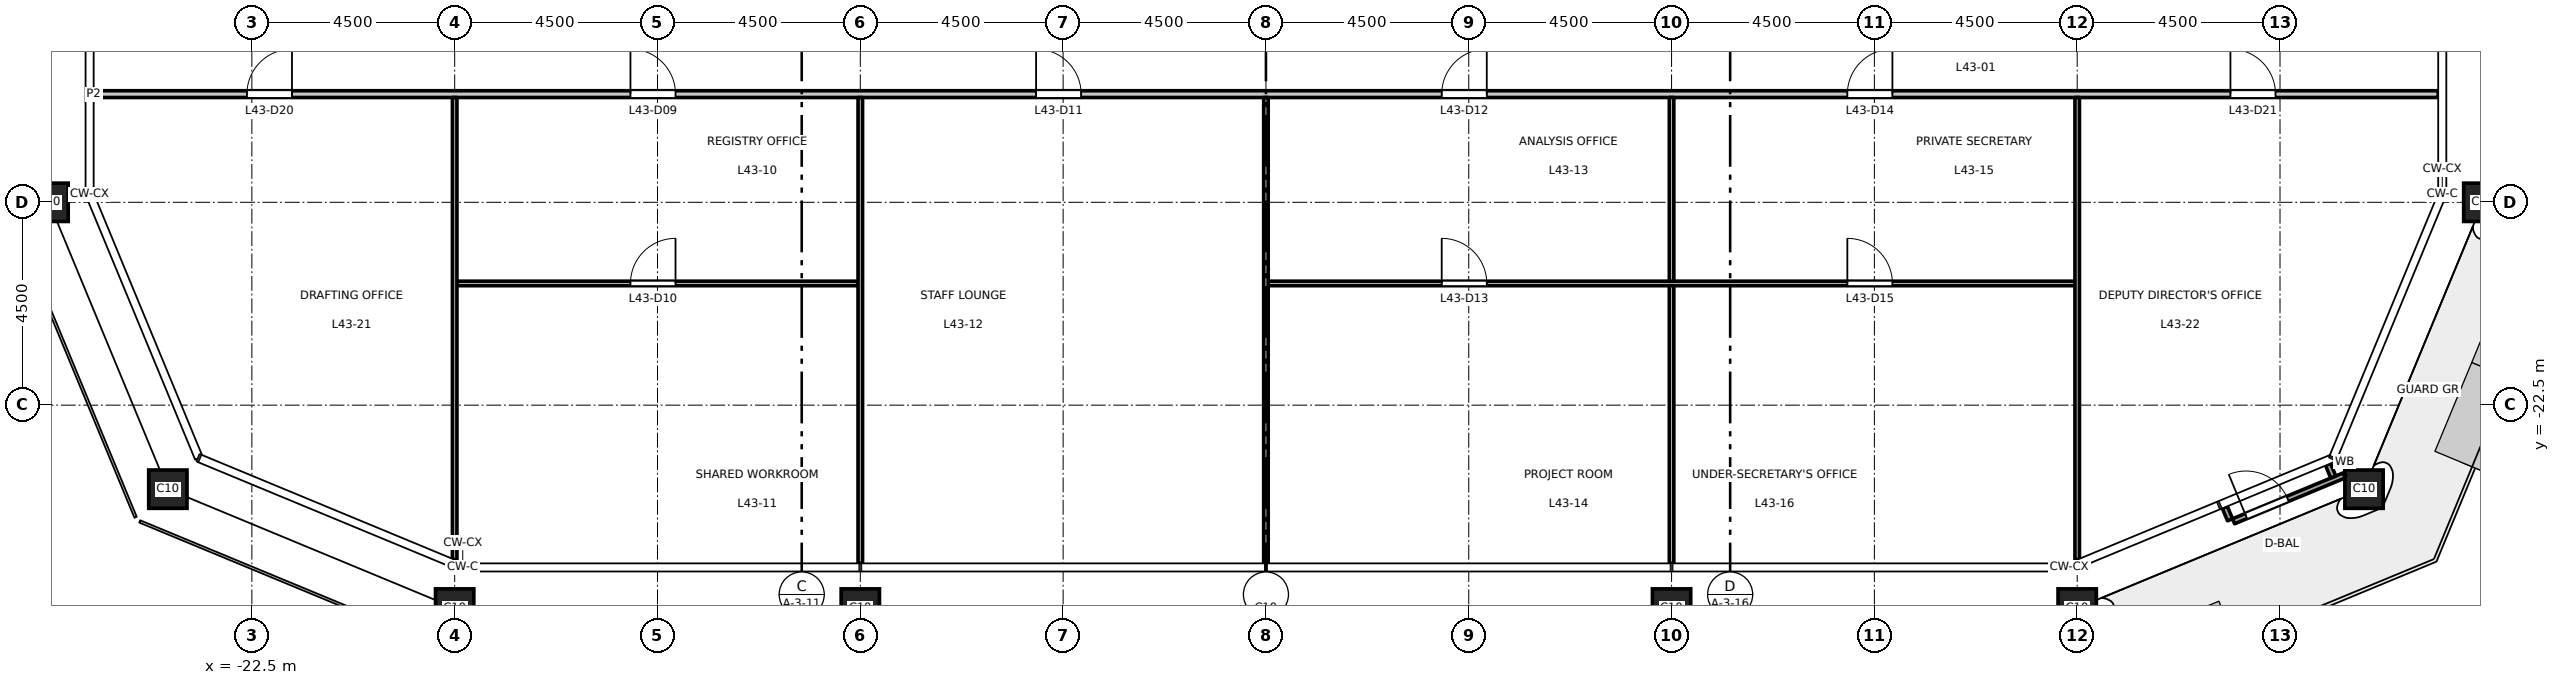
"""IFC4 building model, lengths in metres.
Left out: names, types, materials, properties, quantities, classifications, styles, units other than length and angle.
Written with IfcOpenShell. Run it as: python <this file> out.ifc"""

import sys

from ifc_helpers import new_model, si_unit, direction, frame, frame_2d, origin, origin_2d, place, context, subcontext, project, spatial, rectangle, hollow_rectangle, extrude, element, fill, save


model = new_model("IFC4")
c1 = context("Model", 3, precision=1e-05, world=origin(), true_north=direction((0.0, 1.0)))
c2 = subcontext(c1, "Body", "Model", "MODEL_VIEW")
j1 = project(units=[si_unit("LENGTHUNIT", "METRE"), si_unit("PLANEANGLEUNIT", "RADIAN")], contexts=[c1])
p1 = place(None, origin())
s1 = spatial("IfcSite", under=j1, at=p1, CompositionType="ELEMENT")
p2 = place(p1, origin())
s2 = spatial("IfcBuilding", under=s1, at=p2, CompositionType="ELEMENT")
p3 = place(p2, frame((0.0, 0.0, 201.7)))
s3 = spatial("IfcBuildingStorey", under=s2, at=p3, CompositionType="ELEMENT", Elevation=201.7)
for number, where, z_axis, x_axis in (
    (1, (-18.0, -27.0, 0.0), (0.0, 0.0, 1.0), (1.0, 0.0, 0.0)),
    (2, (-9.0, -27.0, 0.0), (0.0, 0.0, 1.0), (1.0, 0.0, 0.0)),
    (3, (0.0, -27.0, 0.0), (0.0, 0.0, 1.0), (1.0, 0.0, 0.0)),
    (4, (9.0, -27.0, 0.0), (0.0, 0.0, 1.0), (1.0, 0.0, 0.0)),
    (5, (18.0, -27.0, 0.0), (0.0, 0.0, 1.0), (1.0, 0.0, 0.0)),
    (6, (24.364, -24.364, 0.0), (0.0, 0.0, 1.0), (1.0, 0.0, 0.0)),
    (7, (27.0, -18.0, 0.0), (0.0, 0.0, 1.0), (1.0, 0.0, 0.0)),
    (8, (-27.0, -18.0, 0.0), (0.0, 0.0, 1.0), (1.0, 0.0, 0.0)),
    (9, (-24.364, -24.364, 0.0), (0.0, 0.0, 1.0), (1.0, 0.0, 0.0)),
):
    element("IfcColumn", number, at=place(p3, frame(where, z_axis=z_axis, x_axis=x_axis)), inside=s3, PredefinedType="COLUMN", context=c2, shape_type="SweptSolid", body=[
        extrude(hollow_rectangle(XDim=0.85, YDim=0.85, WallThickness=0.05, at=origin_2d()), origin(), (0.0, 0.0, 1.0), 4.5),
    ])
p4 = place(p3, frame((21.276, -24.766, 0.0), z_axis=(0.0, 0.0, 1.0), x_axis=(0.382591441855, -0.923917630863, 0.0)))
e10 = element("IfcWall", 10, at=p4, inside=s3, PredefinedType="STANDARD", context=c2, shape_type="SweptSolid", body=[
    extrude(rectangle(XDim=0.3, YDim=0.12, at=frame_2d((0.15, 0.0))), origin(), (0.0, 0.0, 1.0), 4.35),
])
p5 = place(p3, frame((23.566, -23.818, 0.0), z_axis=(0.0, 0.0, 1.0), x_axis=(0.383285987724, -0.923629715641, 0.0)))
e11 = element("IfcWall", 11, at=p5, inside=s3, PredefinedType="STANDARD", context=c2, shape_type="SweptSolid", body=[
    extrude(rectangle(XDim=0.3, YDim=0.12, at=frame_2d((0.15, 0.0))), origin(), (0.0, 0.0, 1.0), 4.35),
])
p6 = place(p3, frame((21.469, -25.076, 0.0), z_axis=(0.0, 0.0, 1.0), x_axis=(0.923898858671, 0.382636771556, 0.0)))
e12 = element("IfcWall", 12, at=p6, inside=s3, PredefinedType="STANDARD", context=c2, shape_type="SweptSolid", body=[
    extrude(rectangle(XDim=2.673, YDim=0.12, at=frame_2d((1.337, 0.0))), origin(), (0.0, 0.0, 1.0), 4.35),
])
p7 = place(p6, frame((0.3, 0.0, 0.0)))
e13 = element("IfcOpeningElement", 13, at=p7, cuts=e12, PredefinedType="OPENING", context=c2, shape_type="SweptSolid", body=[
    extrude(rectangle(XDim=1.0, YDim=2.4, at=frame_2d((0.5, 1.2))), frame((0.0, 0.07, 0.0), z_axis=(0.0, -1.0, 0.0), x_axis=(1.0, 0.0, 0.0)), (0.0, 0.0, 1.0), 0.14),
])
p8 = place(p3, frame((-17.95, -19.8, 0.0), z_axis=(0.0, 0.0, 1.0), x_axis=(1.0, 0.0, 0.0)))
e14 = element("IfcWall", 14, at=p8, inside=s3, PredefinedType="PARTITIONING", context=c2, shape_type="SweptSolid", body=[
    extrude(rectangle(XDim=8.9, YDim=0.1, at=frame_2d((4.45, 0.0))), origin(), (0.0, 0.0, 1.0), 4.35),
])
p9 = place(p8, frame((3.85, 0.0, 0.0)))
e15 = element("IfcOpeningElement", 15, at=p9, cuts=e14, PredefinedType="OPENING", context=c2, shape_type="SweptSolid", body=[
    extrude(rectangle(XDim=1.0, YDim=2.1, at=frame_2d((0.5, 1.05))), frame((0.0, 0.06, 0.0), z_axis=(0.0, -1.0, 0.0), x_axis=(1.0, 0.0, 0.0)), (0.0, 0.0, 1.0), 0.12),
])
p10 = place(p3, frame((0.05, -19.8, 0.0), z_axis=(0.0, 0.0, 1.0), x_axis=(1.0, 0.0, 0.0)))
e16 = element("IfcWall", 16, at=p10, inside=s3, PredefinedType="PARTITIONING", context=c2, shape_type="SweptSolid", body=[
    extrude(rectangle(XDim=17.9, YDim=0.1, at=frame_2d((8.95, 0.0))), origin(), (0.0, 0.0, 1.0), 4.35),
])
p11 = place(p10, frame((3.85, 0.0, 0.0)))
e17 = element("IfcOpeningElement", 17, at=p11, cuts=e16, PredefinedType="OPENING", context=c2, shape_type="SweptSolid", body=[
    extrude(rectangle(XDim=1.0, YDim=2.1, at=frame_2d((0.5, 1.05))), frame((0.0, 0.06, 0.0), z_axis=(0.0, -1.0, 0.0), x_axis=(1.0, 0.0, 0.0)), (0.0, 0.0, 1.0), 0.12),
])
p12 = place(p10, frame((12.85, 0.0, 0.0)))
e18 = element("IfcOpeningElement", 18, at=p12, cuts=e16, PredefinedType="OPENING", context=c2, shape_type="SweptSolid", body=[
    extrude(rectangle(XDim=1.0, YDim=2.1, at=frame_2d((0.5, 1.05))), frame((0.0, 0.06, 0.0), z_axis=(0.0, -1.0, 0.0), x_axis=(1.0, 0.0, 0.0)), (0.0, 0.0, 1.0), 0.12),
])
p13 = place(p3, frame((-26.01, -15.6, 0.0), z_axis=(0.0, 0.0, 1.0), x_axis=(1.0, 0.0, 0.0)))
e19 = element("IfcWall", 19, at=p13, inside=s3, PredefinedType="PARTITIONING", context=c2, shape_type="SweptSolid", body=[
    extrude(rectangle(XDim=52.02, YDim=0.15, at=frame_2d((26.01, 0.0))), origin(), (0.0, 0.0, 1.0), 4.35),
])
p14 = place(p13, frame((11.91, 0.0, 0.0)))
e20 = element("IfcOpeningElement", 20, at=p14, cuts=e19, PredefinedType="OPENING", context=c2, shape_type="SweptSolid", body=[
    extrude(rectangle(XDim=1.0, YDim=2.1, at=frame_2d((0.5, 1.05))), frame((0.0, 0.085, 0.0), z_axis=(0.0, -1.0, 0.0), x_axis=(1.0, 0.0, 0.0)), (0.0, 0.0, 1.0), 0.17),
])
p15 = place(p13, frame((20.91, 0.0, 0.0)))
e21 = element("IfcOpeningElement", 21, at=p15, cuts=e19, PredefinedType="OPENING", context=c2, shape_type="SweptSolid", body=[
    extrude(rectangle(XDim=1.0, YDim=2.1, at=frame_2d((0.5, 1.05))), frame((0.0, 0.085, 0.0), z_axis=(0.0, -1.0, 0.0), x_axis=(1.0, 0.0, 0.0)), (0.0, 0.0, 1.0), 0.17),
])
p16 = place(p13, frame((29.91, 0.0, 0.0)))
e22 = element("IfcOpeningElement", 22, at=p16, cuts=e19, PredefinedType="OPENING", context=c2, shape_type="SweptSolid", body=[
    extrude(rectangle(XDim=1.0, YDim=2.1, at=frame_2d((0.5, 1.05))), frame((0.0, 0.085, 0.0), z_axis=(0.0, -1.0, 0.0), x_axis=(1.0, 0.0, 0.0)), (0.0, 0.0, 1.0), 0.17),
])
p17 = place(p13, frame((38.91, 0.0, 0.0)))
e23 = element("IfcOpeningElement", 23, at=p17, cuts=e19, PredefinedType="OPENING", context=c2, shape_type="SweptSolid", body=[
    extrude(rectangle(XDim=1.0, YDim=2.1, at=frame_2d((0.5, 1.05))), frame((0.0, 0.085, 0.0), z_axis=(0.0, -1.0, 0.0), x_axis=(1.0, 0.0, 0.0)), (0.0, 0.0, 1.0), 0.17),
])
p18 = place(p13, frame((3.4, 0.0, 0.0)))
e24 = element("IfcOpeningElement", 24, at=p18, cuts=e19, PredefinedType="OPENING", context=c2, shape_type="SweptSolid", body=[
    extrude(rectangle(XDim=1.0, YDim=2.1, at=frame_2d((0.5, 1.05))), frame((0.0, 0.085, 0.0), z_axis=(0.0, -1.0, 0.0), x_axis=(1.0, 0.0, 0.0)), (0.0, 0.0, 1.0), 0.17),
])
p19 = place(p13, frame((47.41, 0.0, 0.0)))
e25 = element("IfcOpeningElement", 25, at=p19, cuts=e19, PredefinedType="OPENING", context=c2, shape_type="SweptSolid", body=[
    extrude(rectangle(XDim=1.0, YDim=2.1, at=frame_2d((0.5, 1.05))), frame((0.0, 0.085, 0.0), z_axis=(0.0, -1.0, 0.0), x_axis=(1.0, 0.0, 0.0)), (0.0, 0.0, 1.0), 0.17),
])
p20 = place(p3, frame((-18.0, -25.928, 0.0), z_axis=(0.0, 0.0, 1.0), x_axis=(0.0, 1.0, 0.0)))
e26 = element("IfcWall", 26, at=p20, inside=s3, PredefinedType="PARTITIONING", context=c2, shape_type="SweptSolid", body=[
    extrude(rectangle(XDim=10.253, YDim=0.1, at=frame_2d((5.126, 0.0))), origin(), (0.0, 0.0, 1.0), 3.65),
])
p21 = place(p3, frame((-9.0, -26.01, 0.0), z_axis=(0.0, 0.0, 1.0), x_axis=(0.0, 1.0, 0.0)))
e27 = element("IfcWall", 27, at=p21, inside=s3, PredefinedType="PARTITIONING", context=c2, shape_type="SweptSolid", body=[
    extrude(rectangle(XDim=10.335, YDim=0.1, at=frame_2d((5.167, 0.0))), origin(), (0.0, 0.0, 1.0), 3.65),
])
p22 = place(p3, frame((0.0, -26.01, 0.0), z_axis=(0.0, 0.0, 1.0), x_axis=(0.0, 1.0, 0.0)))
e28 = element("IfcWall", 28, at=p22, inside=s3, PredefinedType="PARTITIONING", context=c2, shape_type="SweptSolid", body=[
    extrude(rectangle(XDim=10.335, YDim=0.1, at=frame_2d((5.167, 0.0))), origin(), (0.0, 0.0, 1.0), 3.55),
])
p23 = place(p3, frame((9.0, -26.01, 0.0), z_axis=(0.0, 0.0, 1.0), x_axis=(0.0, 1.0, 0.0)))
e29 = element("IfcWall", 29, at=p23, inside=s3, PredefinedType="PARTITIONING", context=c2, shape_type="SweptSolid", body=[
    extrude(rectangle(XDim=6.16, YDim=0.1, at=frame_2d((3.08, 0.0))), origin(), (0.0, 0.0, 1.0), 3.65),
])
p24 = place(p3, frame((9.0, -19.75, 0.0), z_axis=(0.0, 0.0, 1.0), x_axis=(0.0, 1.0, 0.0)))
e30 = element("IfcWall", 30, at=p24, inside=s3, PredefinedType="PARTITIONING", context=c2, shape_type="SweptSolid", body=[
    extrude(rectangle(XDim=4.075, YDim=0.1, at=frame_2d((2.038, 0.0))), origin(), (0.0, 0.0, 1.0), 3.65),
])
p25 = place(p3, frame((18.0, -25.928, 0.0), z_axis=(0.0, 0.0, 1.0), x_axis=(0.0, 1.0, 0.0)))
e31 = element("IfcWall", 31, at=p25, inside=s3, PredefinedType="PARTITIONING", context=c2, shape_type="SweptSolid", body=[
    extrude(rectangle(XDim=10.253, YDim=0.1, at=frame_2d((5.126, 0.0))), origin(), (0.0, 0.0, 1.0), 3.65),
])
p26 = place(p7, origin())
e32 = element("IfcDoor", 32, at=p26, inside=s3, OperationType="SINGLE_SWING_LEFT", PredefinedType="DOOR", context=c2, shape_type="SweptSolid", body=[
    extrude(rectangle(XDim=1.0, YDim=2.4, at=frame_2d((0.5, 1.2))), frame((0.0, 0.025, 0.0), z_axis=(0.0, -1.0, 0.0), x_axis=(1.0, 0.0, 0.0)), (0.0, 0.0, 1.0), 0.05),
])
fill(e13, e32)
p27 = place(p14, origin())
e33 = element("IfcDoor", 33, at=p27, inside=s3, OperationType="SINGLE_SWING_LEFT", PredefinedType="DOOR", context=c2, shape_type="SweptSolid", body=[
    extrude(rectangle(XDim=1.0, YDim=2.1, at=frame_2d((0.5, 1.05))), frame((0.0, 0.025, 0.0), z_axis=(0.0, -1.0, 0.0), x_axis=(1.0, 0.0, 0.0)), (0.0, 0.0, 1.0), 0.05),
])
fill(e20, e33)
p28 = place(p9, origin())
e34 = element("IfcDoor", 34, at=p28, inside=s3, OperationType="SINGLE_SWING_RIGHT", PredefinedType="DOOR", context=c2, shape_type="SweptSolid", body=[
    extrude(rectangle(XDim=1.0, YDim=2.1, at=frame_2d((0.5, 1.05))), frame((0.0, 0.025, 0.0), z_axis=(0.0, -1.0, 0.0), x_axis=(1.0, 0.0, 0.0)), (0.0, 0.0, 1.0), 0.05),
])
fill(e15, e34)
p29 = place(p15, origin())
e35 = element("IfcDoor", 35, at=p29, inside=s3, OperationType="SINGLE_SWING_LEFT", PredefinedType="DOOR", context=c2, shape_type="SweptSolid", body=[
    extrude(rectangle(XDim=1.0, YDim=2.1, at=frame_2d((0.5, 1.05))), frame((0.0, 0.025, 0.0), z_axis=(0.0, -1.0, 0.0), x_axis=(1.0, 0.0, 0.0)), (0.0, 0.0, 1.0), 0.05),
])
fill(e21, e35)
p30 = place(p16, origin())
e36 = element("IfcDoor", 36, at=p30, inside=s3, OperationType="SINGLE_SWING_RIGHT", PredefinedType="DOOR", context=c2, shape_type="SweptSolid", body=[
    extrude(rectangle(XDim=1.0, YDim=2.1, at=frame_2d((0.5, 1.05))), frame((0.0, 0.025, 0.0), z_axis=(0.0, -1.0, 0.0), x_axis=(1.0, 0.0, 0.0)), (0.0, 0.0, 1.0), 0.05),
])
fill(e22, e36)
p31 = place(p11, origin())
e37 = element("IfcDoor", 37, at=p31, inside=s3, OperationType="SINGLE_SWING_LEFT", PredefinedType="DOOR", context=c2, shape_type="SweptSolid", body=[
    extrude(rectangle(XDim=1.0, YDim=2.1, at=frame_2d((0.5, 1.05))), frame((0.0, 0.025, 0.0), z_axis=(0.0, -1.0, 0.0), x_axis=(1.0, 0.0, 0.0)), (0.0, 0.0, 1.0), 0.05),
])
fill(e17, e37)
p32 = place(p17, origin())
e38 = element("IfcDoor", 38, at=p32, inside=s3, OperationType="SINGLE_SWING_RIGHT", PredefinedType="DOOR", context=c2, shape_type="SweptSolid", body=[
    extrude(rectangle(XDim=1.0, YDim=2.1, at=frame_2d((0.5, 1.05))), frame((0.0, 0.025, 0.0), z_axis=(0.0, -1.0, 0.0), x_axis=(1.0, 0.0, 0.0)), (0.0, 0.0, 1.0), 0.05),
])
fill(e23, e38)
p33 = place(p12, origin())
e39 = element("IfcDoor", 39, at=p33, inside=s3, OperationType="SINGLE_SWING_LEFT", PredefinedType="DOOR", context=c2, shape_type="SweptSolid", body=[
    extrude(rectangle(XDim=1.0, YDim=2.1, at=frame_2d((0.5, 1.05))), frame((0.0, 0.025, 0.0), z_axis=(0.0, -1.0, 0.0), x_axis=(1.0, 0.0, 0.0)), (0.0, 0.0, 1.0), 0.05),
])
fill(e18, e39)
p34 = place(p18, origin())
e40 = element("IfcDoor", 40, at=p34, inside=s3, OperationType="SINGLE_SWING_RIGHT", PredefinedType="DOOR", context=c2, shape_type="SweptSolid", body=[
    extrude(rectangle(XDim=1.0, YDim=2.1, at=frame_2d((0.5, 1.05))), frame((0.0, 0.025, 0.0), z_axis=(0.0, -1.0, 0.0), x_axis=(1.0, 0.0, 0.0)), (0.0, 0.0, 1.0), 0.05),
])
fill(e24, e40)
p35 = place(p19, origin())
e41 = element("IfcDoor", 41, at=p35, inside=s3, OperationType="SINGLE_SWING_LEFT", PredefinedType="DOOR", context=c2, shape_type="SweptSolid", body=[
    extrude(rectangle(XDim=1.0, YDim=2.1, at=frame_2d((0.5, 1.05))), frame((0.0, 0.025, 0.0), z_axis=(0.0, -1.0, 0.0), x_axis=(1.0, 0.0, 0.0)), (0.0, 0.0, 1.0), 0.05),
])
fill(e25, e41)
save(model, sys.argv[1])
